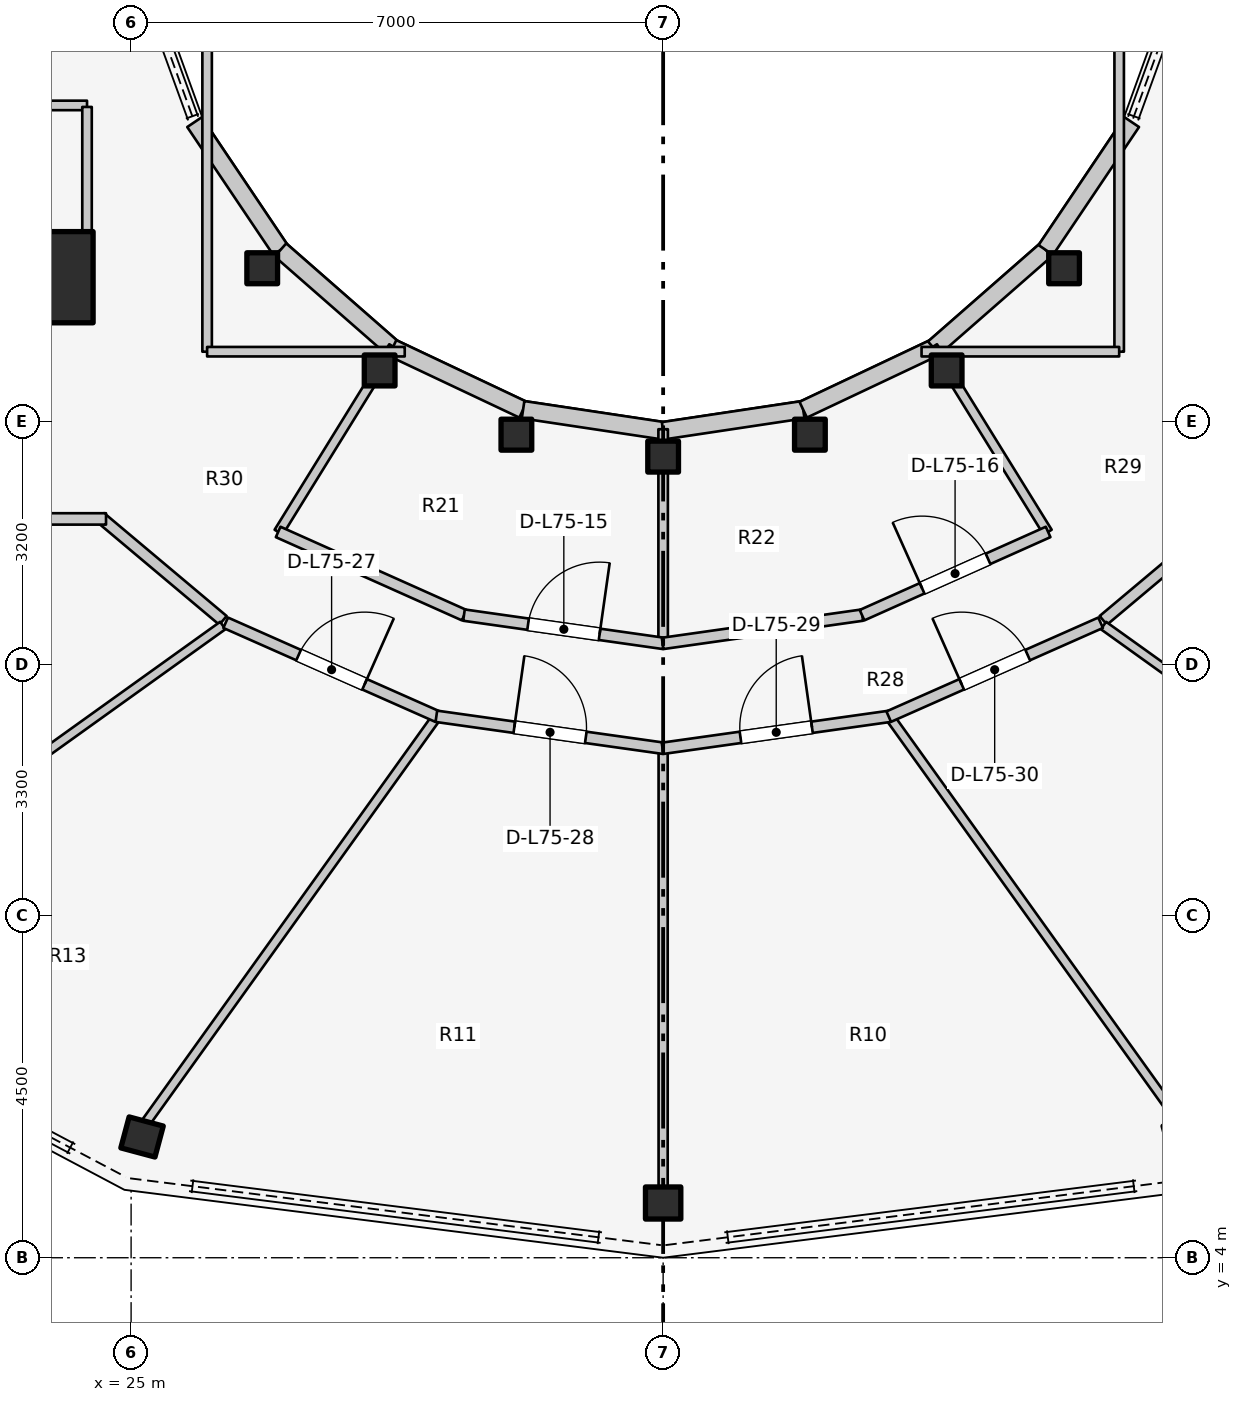
"""IFC4 building model, lengths in metres.
Left out: names, types, materials, properties, quantities, classifications, styles, units other than length and angle.
Written with IfcOpenShell. Run it as: python <this file> out.ifc"""

import sys

from ifc_helpers import new_model, si_unit, direction, frame, frame_2d, origin, origin_2d, place, context, subcontext, project, spatial, rectangle, i_section, extrude, element, fill, save


model = new_model("IFC4")
c1 = context("Model", 3, precision=1e-05, world=origin(), true_north=direction((0.0, 1.0)))
c2 = subcontext(c1, "Body", "Model", "MODEL_VIEW")
j1 = project(units=[si_unit("LENGTHUNIT", "METRE"), si_unit("PLANEANGLEUNIT", "RADIAN")], contexts=[c1])
p1 = place(None, origin())
s1 = spatial("IfcSite", under=j1, at=p1, CompositionType="ELEMENT")
p2 = place(p1, origin())
s2 = spatial("IfcBuilding", under=s1, at=p2, CompositionType="ELEMENT")
p3 = place(p2, frame((0.0, 0.0, 246.0)))
s3 = spatial("IfcBuildingStorey", under=s2, at=p3, CompositionType="ELEMENT", Elevation=246.0)
p4 = place(p3, frame((19.65, 16.55, 0.0), z_axis=(0.0, 0.0, 1.0), x_axis=(1.0, 0.0, 0.0)))
e1 = element("IfcWall", 1, at=p4, inside=s3, PredefinedType="SHEAR", context=c2, shape_type="SweptSolid", body=[
    extrude(rectangle(XDim=4.5, YDim=0.45, at=frame_2d((2.25, 0.0))), origin(), (0.0, 0.0, 1.0), 3.6),
])
p5 = place(p3, frame((23.9, 16.9, 0.0), z_axis=(0.0, 0.0, 1.0), x_axis=(1.0, 0.0, 0.0)))
e2 = element("IfcColumn", 2, at=p5, inside=s3, PredefinedType="COLUMN", context=c2, shape_type="SweptSolid", body=[
    extrude(rectangle(XDim=1.2, YDim=1.2, at=origin_2d()), origin(), (0.0, 0.0, 1.0), 3.6),
])
for number, where, z_axis, x_axis in (
    (3, (26.725, 17.018, 0.0), (0.0, 0.0, 1.0), (1.0, 0.0, 0.0)),
    (4, (28.27, 15.673, 0.0), (0.0, 0.0, 1.0), (1.0, 0.0, 0.0)),
    (5, (30.069, 14.828, 0.0), (0.0, 0.0, 1.0), (1.0, 0.0, 0.0)),
):
    element("IfcColumn", number, at=place(p3, frame(where, z_axis=z_axis, x_axis=x_axis)), inside=s3, PredefinedType="COLUMN", context=c2, shape_type="SweptSolid", body=[
        extrude(i_section(OverallWidth=0.404, OverallDepth=0.407, WebThickness=0.027, FlangeThickness=0.044, FilletRadius=0.025, at=origin_2d()), origin(), (0.0, 0.0, 1.0), 3.6),
    ])
p6 = place(p3, frame((25.144, 5.589, 0.0), z_axis=(0.0, 0.0, 1.0), x_axis=(-0.258819045103, -0.965925826289, 0.0)))
e6 = element("IfcColumn", 6, at=p6, inside=s3, PredefinedType="COLUMN", context=c2, shape_type="SweptSolid", body=[
    extrude(i_section(OverallWidth=0.422, OverallDepth=0.465, WebThickness=0.045, FlangeThickness=0.073, FilletRadius=0.025, at=origin_2d()), origin(), (0.0, 0.0, 1.0), 3.6),
])
p7 = place(p3, frame((32.0, 14.54, 0.0), z_axis=(0.0, 0.0, 1.0), x_axis=(1.0, 0.0, 0.0)))
e7 = element("IfcColumn", 7, at=p7, inside=s3, PredefinedType="COLUMN", context=c2, shape_type="SweptSolid", body=[
    extrude(i_section(OverallWidth=0.404, OverallDepth=0.407, WebThickness=0.027, FlangeThickness=0.044, FilletRadius=0.025, at=origin_2d()), origin(), (0.0, 0.0, 1.0), 3.6),
])
p8 = place(p3, frame((32.0, 4.72, 0.0), z_axis=(0.0, 0.0, 1.0), x_axis=(0.0, -1.0, 0.0)))
e8 = element("IfcColumn", 8, at=p8, inside=s3, PredefinedType="COLUMN", context=c2, shape_type="SweptSolid", body=[
    extrude(i_section(OverallWidth=0.422, OverallDepth=0.465, WebThickness=0.045, FlangeThickness=0.073, FilletRadius=0.025, at=origin_2d()), origin(), (0.0, 0.0, 1.0), 3.6),
])
for number, where, z_axis, x_axis in (
    (9, (33.931, 14.828, 0.0), (0.0, 0.0, 1.0), (1.0, 0.0, 0.0)),
    (10, (35.73, 15.673, 0.0), (0.0, 0.0, 1.0), (1.0, 0.0, 0.0)),
    (11, (37.275, 17.018, 0.0), (0.0, 0.0, 1.0), (1.0, 0.0, 0.0)),
):
    element("IfcColumn", number, at=place(p3, frame(where, z_axis=z_axis, x_axis=x_axis)), inside=s3, PredefinedType="COLUMN", context=c2, shape_type="SweptSolid", body=[
        extrude(i_section(OverallWidth=0.404, OverallDepth=0.407, WebThickness=0.027, FlangeThickness=0.044, FilletRadius=0.025, at=origin_2d()), origin(), (0.0, 0.0, 1.0), 3.6),
    ])
p9 = place(p3, frame((25.834, 18.94, 0.0), z_axis=(0.0, 0.0, 1.0), x_axis=(0.558197800898, -0.829707909492, 0.0)))
e12 = element("IfcWall", 12, at=p9, inside=s3, PredefinedType="STANDARD", context=c2, shape_type="SweptSolid", body=[
    extrude(rectangle(XDim=2.027, YDim=0.23, at=frame_2d((1.013, 0.0))), origin(), (0.0, 0.0, 1.0), 2.6),
])
p10 = place(p3, frame((26.965, 17.258, 0.0), z_axis=(0.0, 0.0, 1.0), x_axis=(0.752576694707, -0.658504607869, 0.0)))
e13 = element("IfcWall", 13, at=p10, inside=s3, PredefinedType="STANDARD", context=c2, shape_type="SweptSolid", body=[
    extrude(rectangle(XDim=1.959, YDim=0.23, at=frame_2d((0.98, 0.0))), origin(), (0.0, 0.0, 1.0), 2.6),
])
p11 = place(p3, frame((28.44, 15.968, 0.0), z_axis=(0.0, 0.0, 1.0), x_axis=(0.904179699603, -0.427152280606, 0.0)))
e14 = element("IfcWall", 14, at=p11, inside=s3, PredefinedType="STANDARD", context=c2, shape_type="SweptSolid", body=[
    extrude(rectangle(XDim=1.899, YDim=0.23, at=frame_2d((0.95, 0.0))), origin(), (0.0, 0.0, 1.0), 2.6),
])
for number, where, z_axis, x_axis in (
    (15, (30.157, 15.157, 0.0), (0.0, 0.0, 1.0), (0.989, -0.149, 0.0)),
    (16, (32.0, 14.88, 0.0), (0.0, 0.0, 1.0), (0.989, 0.149, 0.0)),
):
    element("IfcWall", number, at=place(p3, frame(where, z_axis=z_axis, x_axis=x_axis)), inside=s3, PredefinedType="STANDARD", context=c2, shape_type="SweptSolid", body=[
        extrude(rectangle(XDim=1.864, YDim=0.23, at=frame_2d((0.932, 0.0))), origin(), (0.0, 0.0, 1.0), 2.6),
    ])
p12 = place(p3, frame((33.843, 15.157, 0.0), z_axis=(0.0, 0.0, 1.0), x_axis=(0.904179699603, 0.427152280606, 0.0)))
e17 = element("IfcWall", 17, at=p12, inside=s3, PredefinedType="STANDARD", context=c2, shape_type="SweptSolid", body=[
    extrude(rectangle(XDim=1.899, YDim=0.23, at=frame_2d((0.95, 0.0))), origin(), (0.0, 0.0, 1.0), 2.6),
])
p13 = place(p3, frame((35.56, 15.968, 0.0), z_axis=(0.0, 0.0, 1.0), x_axis=(0.752576694707, 0.658504607869, 0.0)))
e18 = element("IfcWall", 18, at=p13, inside=s3, PredefinedType="STANDARD", context=c2, shape_type="SweptSolid", body=[
    extrude(rectangle(XDim=1.959, YDim=0.23, at=frame_2d((0.98, 0.0))), origin(), (0.0, 0.0, 1.0), 2.6),
])
p14 = place(p3, frame((37.035, 17.258, 0.0), z_axis=(0.0, 0.0, 1.0), x_axis=(0.558197800898, 0.829707909492, 0.0)))
e19 = element("IfcWall", 19, at=p14, inside=s3, PredefinedType="STANDARD", context=c2, shape_type="SweptSolid", body=[
    extrude(rectangle(XDim=2.027, YDim=0.23, at=frame_2d((1.013, 0.0))), origin(), (0.0, 0.0, 1.0), 2.6),
])
p15 = place(p3, frame((19.55, 19.16, 0.0), z_axis=(0.0, 0.0, 1.0), x_axis=(1.0, 0.0, 0.0)))
e20 = element("IfcWall", 20, at=p15, inside=s3, PredefinedType="PARTITIONING", context=c2, shape_type="SweptSolid", body=[
    extrude(rectangle(XDim=4.87, YDim=0.125, at=frame_2d((2.435, 0.0))), origin(), (0.0, 0.0, 1.0), 2.62),
])
p16 = place(p15, frame((2.272, 0.0, 0.0)))
e21 = element("IfcOpeningElement", 21, at=p16, cuts=e20, PredefinedType="OPENING", context=c2, shape_type="SweptSolid", body=[
    extrude(rectangle(XDim=0.85, YDim=2.05, at=frame_2d((0.425, 1.025))), frame((0.0, 0.073, 0.0), z_axis=(0.0, -1.0, 0.0), x_axis=(1.0, 0.0, 0.0)), (0.0, 0.0, 1.0), 0.145),
])
p17 = place(p3, frame((24.42, 17.1, 0.0), z_axis=(0.0, 0.0, 1.0), x_axis=(0.0, 1.0, 0.0)))
e22 = element("IfcWall", 22, at=p17, inside=s3, PredefinedType="PARTITIONING", context=c2, shape_type="SweptSolid", body=[
    extrude(rectangle(XDim=2.04, YDim=0.125, at=frame_2d((1.02, 0.0))), origin(), (0.0, 0.0, 1.0), 2.672),
])
p18 = place(p3, frame((28.45, 15.985, 0.0), z_axis=(0.0, 0.0, 1.0), x_axis=(-0.52592395012, -0.850531597702, 0.0)))
e23 = element("IfcWall", 23, at=p18, inside=s3, PredefinedType="PARTITIONING", context=c2, shape_type="SweptSolid", body=[
    extrude(rectangle(XDim=2.869, YDim=0.125, at=frame_2d((1.435, 0.0))), origin(), (0.0, 0.0, 1.0), 2.672),
])
p19 = place(p3, frame((32.0, 14.9, 0.0), z_axis=(0.0, 0.0, 1.0), x_axis=(0.0, -1.0, 0.0)))
e24 = element("IfcWall", 24, at=p19, inside=s3, PredefinedType="PARTITIONING", context=c2, shape_type="SweptSolid", body=[
    extrude(rectangle(XDim=2.818, YDim=0.125, at=frame_2d((1.409, 0.0))), origin(), (0.0, 0.0, 1.0), 2.672),
])
p20 = place(p3, frame((35.55, 15.985, 0.0), z_axis=(0.0, 0.0, 1.0), x_axis=(0.52592395012, -0.850531597702, 0.0)))
e25 = element("IfcWall", 25, at=p20, inside=s3, PredefinedType="PARTITIONING", context=c2, shape_type="SweptSolid", body=[
    extrude(rectangle(XDim=2.869, YDim=0.125, at=frame_2d((1.435, 0.0))), origin(), (0.0, 0.0, 1.0), 2.672),
])
p21 = place(p3, frame((26.935, 13.549, 0.0), z_axis=(0.0, 0.0, 1.0), x_axis=(0.912859324183, -0.408274239027, 0.0)))
e26 = element("IfcWall", 26, at=p21, inside=s3, PredefinedType="PARTITIONING", context=c2, shape_type="SweptSolid", body=[
    extrude(rectangle(XDim=2.682, YDim=0.15, at=frame_2d((1.341, 0.0))), origin(), (0.0, 0.0, 1.0), 2.816),
])
p22 = place(p3, frame((29.38, 12.455, 0.0), z_axis=(0.0, 0.0, 1.0), x_axis=(0.990096156252, -0.140390887794, 0.0)))
e27 = element("IfcWall", 27, at=p22, inside=s3, PredefinedType="PARTITIONING", context=c2, shape_type="SweptSolid", body=[
    extrude(rectangle(XDim=2.654, YDim=0.15, at=frame_2d((1.327, 0.0))), origin(), (0.0, 0.0, 1.0), 2.816),
])
p23 = place(p22, frame((0.852, 0.0, 0.0)))
e28 = element("IfcOpeningElement", 28, at=p23, cuts=e27, PredefinedType="OPENING", context=c2, shape_type="SweptSolid", body=[
    extrude(rectangle(XDim=0.95, YDim=2.1, at=frame_2d((0.475, 1.05))), frame((0.0, 0.085, 0.0), z_axis=(0.0, -1.0, 0.0), x_axis=(1.0, 0.0, 0.0)), (0.0, 0.0, 1.0), 0.17),
])
p24 = place(p3, frame((31.993, 12.082, 0.0), z_axis=(0.0, 0.0, 1.0), x_axis=(0.990096156252, 0.140390887794, 0.0)))
e29 = element("IfcWall", 29, at=p24, inside=s3, PredefinedType="PARTITIONING", context=c2, shape_type="SweptSolid", body=[
    extrude(rectangle(XDim=2.654, YDim=0.15, at=frame_2d((1.327, 0.0))), origin(), (0.0, 0.0, 1.0), 2.816),
])
p25 = place(p3, frame((34.617, 12.454, 0.0), z_axis=(0.0, 0.0, 1.0), x_axis=(0.912859324183, 0.408274239027, 0.0)))
e30 = element("IfcWall", 30, at=p25, inside=s3, PredefinedType="PARTITIONING", context=c2, shape_type="SweptSolid", body=[
    extrude(rectangle(XDim=2.682, YDim=0.15, at=frame_2d((1.341, 0.0))), origin(), (0.0, 0.0, 1.0), 2.816),
])
p26 = place(p25, frame((0.866, 0.0, 0.0)))
e31 = element("IfcOpeningElement", 31, at=p26, cuts=e30, PredefinedType="OPENING", context=c2, shape_type="SweptSolid", body=[
    extrude(rectangle(XDim=0.95, YDim=2.1, at=frame_2d((0.475, 1.05))), frame((0.0, 0.085, 0.0), z_axis=(0.0, -1.0, 0.0), x_axis=(1.0, 0.0, 0.0)), (0.0, 0.0, 1.0), 0.17),
])
p27 = place(p3, frame((26.0, 15.92, 0.0), z_axis=(0.0, 0.0, 1.0), x_axis=(0.0, 1.0, 0.0)))
e32 = element("IfcWall", 32, at=p27, inside=s3, PredefinedType="PARTITIONING", context=c2, shape_type="SweptSolid", body=[
    extrude(rectangle(XDim=4.28, YDim=0.125, at=frame_2d((2.14, 0.0))), origin(), (0.0, 0.0, 1.0), 2.672),
])
p28 = place(p3, frame((26.0, 15.92, 0.0), z_axis=(0.0, 0.0, 1.0), x_axis=(1.0, 0.0, 0.0)))
e33 = element("IfcWall", 33, at=p28, inside=s3, PredefinedType="PARTITIONING", context=c2, shape_type="SweptSolid", body=[
    extrude(rectangle(XDim=2.6, YDim=0.125, at=frame_2d((1.3, 0.0))), origin(), (0.0, 0.0, 1.0), 2.672),
])
p29 = place(p3, frame((38.0, 15.92, 0.0), z_axis=(0.0, 0.0, 1.0), x_axis=(0.0, 1.0, 0.0)))
e34 = element("IfcWall", 34, at=p29, inside=s3, PredefinedType="PARTITIONING", context=c2, shape_type="SweptSolid", body=[
    extrude(rectangle(XDim=4.28, YDim=0.125, at=frame_2d((2.14, 0.0))), origin(), (0.0, 0.0, 1.0), 2.672),
])
p30 = place(p3, frame((35.4, 15.92, 0.0), z_axis=(0.0, 0.0, 1.0), x_axis=(1.0, 0.0, 0.0)))
e35 = element("IfcWall", 35, at=p30, inside=s3, PredefinedType="PARTITIONING", context=c2, shape_type="SweptSolid", body=[
    extrude(rectangle(XDim=2.6, YDim=0.125, at=frame_2d((1.3, 0.0))), origin(), (0.0, 0.0, 1.0), 2.672),
])
p31 = place(p3, frame((26.209, 12.385, 0.0), z_axis=(0.0, 0.0, 1.0), x_axis=(-0.765677451641, 0.643224719711, 0.0)))
e36 = element("IfcWall", 36, at=p31, inside=s3, PredefinedType="PARTITIONING", context=c2, shape_type="SweptSolid", body=[
    extrude(rectangle(XDim=2.105, YDim=0.15, at=frame_2d((1.053, 0.0))), origin(), (0.0, 0.0, 1.0), 2.816),
])
p32 = place(p3, frame((17.15, 13.72, 0.0), z_axis=(0.0, 0.0, 1.0), x_axis=(1.0, 0.0, 0.0)))
e37 = element("IfcWall", 37, at=p32, inside=s3, PredefinedType="PARTITIONING", context=c2, shape_type="SweptSolid", body=[
    extrude(rectangle(XDim=7.52, YDim=0.15, at=frame_2d((3.76, 0.0))), origin(), (0.0, 0.0, 1.0), 2.816),
])
p33 = place(p32, frame((1.3, 0.0, 0.0)))
e38 = element("IfcOpeningElement", 38, at=p33, cuts=e37, PredefinedType="OPENING", context=c2, shape_type="SweptSolid", body=[
    extrude(rectangle(XDim=0.9, YDim=2.1, at=frame_2d((0.45, 1.05))), frame((0.0, 0.085, 0.0), z_axis=(0.0, -1.0, 0.0), x_axis=(1.0, 0.0, 0.0)), (0.0, 0.0, 1.0), 0.17),
])
p34 = place(p3, frame((37.791, 12.385, 0.0), z_axis=(0.0, 0.0, 1.0), x_axis=(0.765677451641, 0.643224719711, 0.0)))
e39 = element("IfcWall", 39, at=p34, inside=s3, PredefinedType="PARTITIONING", context=c2, shape_type="SweptSolid", body=[
    extrude(rectangle(XDim=2.105, YDim=0.15, at=frame_2d((1.053, 0.0))), origin(), (0.0, 0.0, 1.0), 2.816),
])
p35 = place(p3, frame((26.206, 12.318, 0.0), z_axis=(0.0, 0.0, 1.0), x_axis=(-0.812763742602, -0.582593424879, 0.0)))
e40 = element("IfcWall", 40, at=p35, inside=s3, PredefinedType="MOVABLE", context=c2, shape_type="SweptSolid", body=[
    extrude(rectangle(XDim=6.966, YDim=0.12, at=frame_2d((3.483, 0.0))), origin(), (0.0, 0.0, 1.0), 2.66),
])
p36 = place(p3, frame((28.992, 11.076, 0.0), z_axis=(0.0, 0.0, 1.0), x_axis=(-0.582726066442, -0.812668648029, 0.0)))
e41 = element("IfcWall", 41, at=p36, inside=s3, PredefinedType="MOVABLE", context=c2, shape_type="SweptSolid", body=[
    extrude(rectangle(XDim=6.515, YDim=0.12, at=frame_2d((3.257, 0.0))), origin(), (0.0, 0.0, 1.0), 2.66),
])
p37 = place(p3, frame((32.0, 10.647, 0.0), z_axis=(0.0, 0.0, 1.0), x_axis=(0.0, -1.0, 0.0)))
e42 = element("IfcWall", 42, at=p37, inside=s3, PredefinedType="MOVABLE", context=c2, shape_type="SweptSolid", body=[
    extrude(rectangle(XDim=5.727, YDim=0.12, at=frame_2d((2.864, 0.0))), origin(), (0.0, 0.0, 1.0), 2.66),
])
p38 = place(p3, frame((35.008, 11.076, 0.0), z_axis=(0.0, 0.0, 1.0), x_axis=(0.582726066442, -0.812668648029, 0.0)))
e43 = element("IfcWall", 43, at=p38, inside=s3, PredefinedType="MOVABLE", context=c2, shape_type="SweptSolid", body=[
    extrude(rectangle(XDim=6.515, YDim=0.12, at=frame_2d((3.257, 0.0))), origin(), (0.0, 0.0, 1.0), 2.66),
])
p39 = place(p3, frame((37.794, 12.318, 0.0), z_axis=(0.0, 0.0, 1.0), x_axis=(0.812763742602, -0.582593424879, 0.0)))
e44 = element("IfcWall", 44, at=p39, inside=s3, PredefinedType="MOVABLE", context=c2, shape_type="SweptSolid", body=[
    extrude(rectangle(XDim=6.966, YDim=0.12, at=frame_2d((3.483, 0.0))), origin(), (0.0, 0.0, 1.0), 2.66),
])
p40 = place(p3, frame((26.244, 12.354, 0.0), z_axis=(0.0, 0.0, 1.0), x_axis=(0.914302802833, -0.405031337963, 0.0)))
e45 = element("IfcWall", 45, at=p40, inside=s3, PredefinedType="PARTITIONING", context=c2, shape_type="SweptSolid", body=[
    extrude(rectangle(XDim=3.049, YDim=0.15, at=frame_2d((1.525, 0.0))), origin(), (0.0, 0.0, 1.0), 2.816),
])
p41 = place(p40, frame((1.05, 0.0, 0.0)))
e46 = element("IfcOpeningElement", 46, at=p41, cuts=e45, PredefinedType="OPENING", context=c2, shape_type="SweptSolid", body=[
    extrude(rectangle(XDim=0.95, YDim=2.1, at=frame_2d((0.475, 1.05))), frame((0.0, 0.085, 0.0), z_axis=(0.0, -1.0, 0.0), x_axis=(1.0, 0.0, 0.0)), (0.0, 0.0, 1.0), 0.17),
])
p42 = place(p3, frame((29.016, 11.123, 0.0), z_axis=(0.0, 0.0, 1.0), x_axis=(0.990225561979, -0.139475217886, 0.0)))
e47 = element("IfcWall", 47, at=p42, inside=s3, PredefinedType="PARTITIONING", context=c2, shape_type="SweptSolid", body=[
    extrude(rectangle(XDim=3.021, YDim=0.15, at=frame_2d((1.511, 0.0))), origin(), (0.0, 0.0, 1.0), 2.816),
])
p43 = place(p42, frame((1.036, 0.0, 0.0)))
e48 = element("IfcOpeningElement", 48, at=p43, cuts=e47, PredefinedType="OPENING", context=c2, shape_type="SweptSolid", body=[
    extrude(rectangle(XDim=0.95, YDim=2.1, at=frame_2d((0.475, 1.05))), frame((0.0, 0.085, 0.0), z_axis=(0.0, -1.0, 0.0), x_axis=(1.0, 0.0, 0.0)), (0.0, 0.0, 1.0), 0.17),
])
p44 = place(p3, frame((31.992, 10.702, 0.0), z_axis=(0.0, 0.0, 1.0), x_axis=(0.990225561979, 0.139475217886, 0.0)))
e49 = element("IfcWall", 49, at=p44, inside=s3, PredefinedType="PARTITIONING", context=c2, shape_type="SweptSolid", body=[
    extrude(rectangle(XDim=3.021, YDim=0.15, at=frame_2d((1.511, 0.0))), origin(), (0.0, 0.0, 1.0), 2.816),
])
p45 = place(p44, frame((1.036, 0.0, 0.0)))
e50 = element("IfcOpeningElement", 50, at=p45, cuts=e49, PredefinedType="OPENING", context=c2, shape_type="SweptSolid", body=[
    extrude(rectangle(XDim=0.95, YDim=2.1, at=frame_2d((0.475, 1.05))), frame((0.0, 0.085, 0.0), z_axis=(0.0, -1.0, 0.0), x_axis=(1.0, 0.0, 0.0)), (0.0, 0.0, 1.0), 0.17),
])
p46 = place(p3, frame((34.968, 11.119, 0.0), z_axis=(0.0, 0.0, 1.0), x_axis=(0.914302802833, 0.405031337963, 0.0)))
e51 = element("IfcWall", 51, at=p46, inside=s3, PredefinedType="PARTITIONING", context=c2, shape_type="SweptSolid", body=[
    extrude(rectangle(XDim=3.049, YDim=0.15, at=frame_2d((1.525, 0.0))), origin(), (0.0, 0.0, 1.0), 2.816),
])
p47 = place(p46, frame((1.05, 0.0, 0.0)))
e52 = element("IfcOpeningElement", 52, at=p47, cuts=e51, PredefinedType="OPENING", context=c2, shape_type="SweptSolid", body=[
    extrude(rectangle(XDim=0.95, YDim=2.1, at=frame_2d((0.475, 1.05))), frame((0.0, 0.085, 0.0), z_axis=(0.0, -1.0, 0.0), x_axis=(1.0, 0.0, 0.0)), (0.0, 0.0, 1.0), 0.17),
])
p48 = place(p23, origin())
e53 = element("IfcDoor", 53, at=p48, inside=s3, OperationType="SINGLE_SWING_RIGHT", PredefinedType="DOOR", context=c2, shape_type="SweptSolid", body=[
    extrude(rectangle(XDim=0.95, YDim=2.1, at=frame_2d((0.475, 1.05))), frame((0.0, 0.025, 0.0), z_axis=(0.0, -1.0, 0.0), x_axis=(1.0, 0.0, 0.0)), (0.0, 0.0, 1.0), 0.05),
])
fill(e28, e53)
p49 = place(p26, origin())
e54 = element("IfcDoor", 54, at=p49, inside=s3, OperationType="SINGLE_SWING_LEFT", PredefinedType="DOOR", context=c2, shape_type="SweptSolid", body=[
    extrude(rectangle(XDim=0.95, YDim=2.1, at=frame_2d((0.475, 1.05))), frame((0.0, 0.025, 0.0), z_axis=(0.0, -1.0, 0.0), x_axis=(1.0, 0.0, 0.0)), (0.0, 0.0, 1.0), 0.05),
])
fill(e31, e54)
p50 = place(p41, origin())
e55 = element("IfcDoor", 55, at=p50, inside=s3, OperationType="SINGLE_SWING_RIGHT", PredefinedType="DOOR", context=c2, shape_type="SweptSolid", body=[
    extrude(rectangle(XDim=0.95, YDim=2.1, at=frame_2d((0.475, 1.05))), frame((0.0, 0.025, 0.0), z_axis=(0.0, -1.0, 0.0), x_axis=(1.0, 0.0, 0.0)), (0.0, 0.0, 1.0), 0.05),
])
fill(e46, e55)
p51 = place(p43, origin())
e56 = element("IfcDoor", 56, at=p51, inside=s3, OperationType="SINGLE_SWING_LEFT", PredefinedType="DOOR", context=c2, shape_type="SweptSolid", body=[
    extrude(rectangle(XDim=0.95, YDim=2.1, at=frame_2d((0.475, 1.05))), frame((0.0, 0.025, 0.0), z_axis=(0.0, -1.0, 0.0), x_axis=(1.0, 0.0, 0.0)), (0.0, 0.0, 1.0), 0.05),
])
fill(e48, e56)
p52 = place(p45, origin())
e57 = element("IfcDoor", 57, at=p52, inside=s3, OperationType="SINGLE_SWING_RIGHT", PredefinedType="DOOR", context=c2, shape_type="SweptSolid", body=[
    extrude(rectangle(XDim=0.95, YDim=2.1, at=frame_2d((0.475, 1.05))), frame((0.0, 0.025, 0.0), z_axis=(0.0, -1.0, 0.0), x_axis=(1.0, 0.0, 0.0)), (0.0, 0.0, 1.0), 0.05),
])
fill(e50, e57)
p53 = place(p47, origin())
e58 = element("IfcDoor", 58, at=p53, inside=s3, OperationType="SINGLE_SWING_LEFT", PredefinedType="DOOR", context=c2, shape_type="SweptSolid", body=[
    extrude(rectangle(XDim=0.95, YDim=2.1, at=frame_2d((0.475, 1.05))), frame((0.0, 0.025, 0.0), z_axis=(0.0, -1.0, 0.0), x_axis=(1.0, 0.0, 0.0)), (0.0, 0.0, 1.0), 0.05),
])
fill(e52, e58)
save(model, sys.argv[1])
